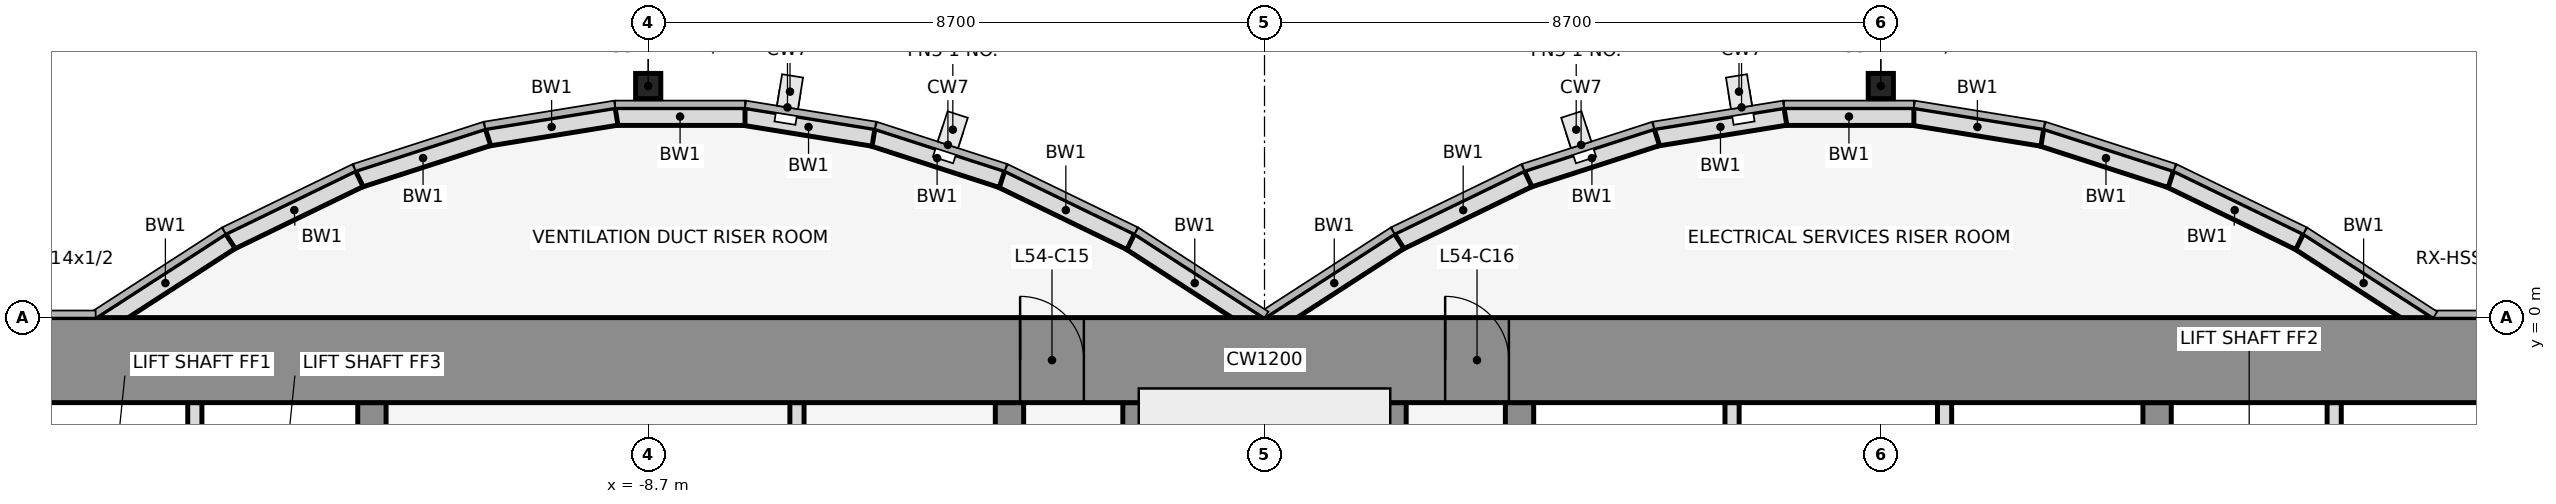
"""IFC4 building model, lengths in metres.
Left out: names, types, materials, properties, quantities, classifications, styles, units other than length and angle.
Written with IfcOpenShell. Run it as: python <this file> out.ifc"""

import sys

from ifc_helpers import new_model, si_unit, direction, frame, frame_2d, origin, origin_2d, place, context, subcontext, project, spatial, rectangle, hollow_rectangle, extrude, element, fill, save


model = new_model("IFC4")
c1 = context("Model", 3, precision=1e-05, world=origin(), true_north=direction((0.0, 1.0)))
c2 = subcontext(c1, "Body", "Model", "MODEL_VIEW")
j1 = project(units=[si_unit("LENGTHUNIT", "METRE"), si_unit("PLANEANGLEUNIT", "RADIAN")], contexts=[c1])
p1 = place(None, origin())
s1 = spatial("IfcSite", under=j1, at=p1, CompositionType="ELEMENT")
p2 = place(p1, origin())
s2 = spatial("IfcBuilding", under=s1, at=p2, CompositionType="ELEMENT")
p3 = place(p2, frame((0.0, 0.0, 241.4)))
s3 = spatial("IfcBuildingStorey", under=s2, at=p3, CompositionType="ELEMENT", Elevation=241.4)
for number, where, z_axis, x_axis in (
    (1, (-8.7, 3.269, 0.0), (0.0, 0.0, 1.0), (1.0, 0.0, 0.0)),
    (2, (8.7, 3.269, 0.0), (0.0, 0.0, 1.0), (1.0, 0.0, 0.0)),
):
    element("IfcColumn", number, at=place(p3, frame(where, z_axis=z_axis, x_axis=x_axis)), inside=s3, PredefinedType="COLUMN", context=c2, shape_type="SweptSolid", body=[
        extrude(hollow_rectangle(XDim=0.356, YDim=0.356, WallThickness=0.012, at=origin_2d()), origin(), (0.0, 0.0, 1.0), 4.2),
    ])
p4 = place(p3, frame((16.432, -0.105, 0.0), z_axis=(0.0, 0.0, 1.0), x_axis=(-0.83981312244, 0.542875602121, 0.0)))
e3 = element("IfcWall", 3, at=p4, inside=s3, PredefinedType="STANDARD", context=c2, shape_type="SweptSolid", body=[
    extrude(rectangle(XDim=2.183, YDim=0.25, at=frame_2d((1.091, 0.0))), origin(), (0.0, 0.0, 1.0), 4.05),
])
p5 = place(p3, frame((14.612, 1.073, 0.0), z_axis=(0.0, 0.0, 1.0), x_axis=(-0.89982408427, 0.436252928206, 0.0)))
e4 = element("IfcWall", 4, at=p5, inside=s3, PredefinedType="STANDARD", context=c2, shape_type="SweptSolid", body=[
    extrude(rectangle(XDim=2.038, YDim=0.25, at=frame_2d((1.019, 0.0))), origin(), (0.0, 0.0, 1.0), 4.05),
])
p6 = place(p3, frame((12.795, 1.955, 0.0), z_axis=(0.0, 0.0, 1.0), x_axis=(-0.951495806175, 0.307661714928, 0.0)))
e5 = element("IfcWall", 5, at=p6, inside=s3, PredefinedType="STANDARD", context=c2, shape_type="SweptSolid", body=[
    extrude(rectangle(XDim=1.927, YDim=0.25, at=frame_2d((0.963, 0.0))), origin(), (0.0, 0.0, 1.0), 4.05),
])
p7 = place(p3, frame((10.98, 2.543, 0.0), z_axis=(0.0, 0.0, 1.0), x_axis=(-0.987181718931, 0.159600293885, 0.0)))
e6 = element("IfcWall", 6, at=p7, inside=s3, PredefinedType="STANDARD", context=c2, shape_type="SweptSolid", body=[
    extrude(rectangle(XDim=1.857, YDim=0.25, at=frame_2d((0.929, 0.0))), origin(), (0.0, 0.0, 1.0), 4.05),
])
p8 = place(p3, frame((9.167, 2.838, 0.0), z_axis=(0.0, 0.0, 1.0), x_axis=(-1.0, 0.0, 0.0)))
e7 = element("IfcWall", 7, at=p8, inside=s3, PredefinedType="STANDARD", context=c2, shape_type="SweptSolid", body=[
    extrude(rectangle(XDim=1.833, YDim=0.25, at=frame_2d((0.917, 0.0))), origin(), (0.0, 0.0, 1.0), 4.05),
])
p9 = place(p3, frame((7.353, 2.84, 0.0), z_axis=(0.0, 0.0, 1.0), x_axis=(-0.987181718931, -0.159600293885, 0.0)))
e8 = element("IfcWall", 8, at=p9, inside=s3, PredefinedType="STANDARD", context=c2, shape_type="SweptSolid", body=[
    extrude(rectangle(XDim=1.857, YDim=0.25, at=frame_2d((0.929, 0.0))), origin(), (0.0, 0.0, 1.0), 4.05),
])
p10 = place(p3, frame((5.538, 2.548, 0.0), z_axis=(0.0, 0.0, 1.0), x_axis=(-0.951495806175, -0.307661714928, 0.0)))
e9 = element("IfcWall", 9, at=p10, inside=s3, PredefinedType="STANDARD", context=c2, shape_type="SweptSolid", body=[
    extrude(rectangle(XDim=1.927, YDim=0.25, at=frame_2d((0.963, 0.0))), origin(), (0.0, 0.0, 1.0), 4.05),
])
p11 = place(p3, frame((3.721, 1.962, 0.0), z_axis=(0.0, 0.0, 1.0), x_axis=(-0.89982408427, -0.436252928206, 0.0)))
e10 = element("IfcWall", 10, at=p11, inside=s3, PredefinedType="STANDARD", context=c2, shape_type="SweptSolid", body=[
    extrude(rectangle(XDim=2.038, YDim=0.25, at=frame_2d((1.019, 0.0))), origin(), (0.0, 0.0, 1.0), 4.05),
])
for number, where, z_axis, x_axis in (
    (11, (1.901, 1.08, 0.0), (0.0, 0.0, 1.0), (-0.84, -0.543, 0.0)),
    (12, (-0.068, -0.105, 0.0), (0.0, 0.0, 1.0), (-0.84, 0.543, 0.0)),
):
    element("IfcWall", number, at=place(p3, frame(where, z_axis=z_axis, x_axis=x_axis)), inside=s3, PredefinedType="STANDARD", context=c2, shape_type="SweptSolid", body=[
        extrude(rectangle(XDim=2.183, YDim=0.25, at=frame_2d((1.091, 0.0))), origin(), (0.0, 0.0, 1.0), 4.05),
    ])
p12 = place(p3, frame((-1.888, 1.073, 0.0), z_axis=(0.0, 0.0, 1.0), x_axis=(-0.89982408427, 0.436252928206, 0.0)))
e13 = element("IfcWall", 13, at=p12, inside=s3, PredefinedType="STANDARD", context=c2, shape_type="SweptSolid", body=[
    extrude(rectangle(XDim=2.038, YDim=0.25, at=frame_2d((1.019, 0.0))), origin(), (0.0, 0.0, 1.0), 4.05),
])
p13 = place(p3, frame((-3.705, 1.955, 0.0), z_axis=(0.0, 0.0, 1.0), x_axis=(-0.951495806175, 0.307661714928, 0.0)))
e14 = element("IfcWall", 14, at=p13, inside=s3, PredefinedType="STANDARD", context=c2, shape_type="SweptSolid", body=[
    extrude(rectangle(XDim=1.927, YDim=0.25, at=frame_2d((0.963, 0.0))), origin(), (0.0, 0.0, 1.0), 4.05),
])
p14 = place(p3, frame((-5.52, 2.543, 0.0), z_axis=(0.0, 0.0, 1.0), x_axis=(-0.987181718931, 0.159600293885, 0.0)))
e15 = element("IfcWall", 15, at=p14, inside=s3, PredefinedType="STANDARD", context=c2, shape_type="SweptSolid", body=[
    extrude(rectangle(XDim=1.857, YDim=0.25, at=frame_2d((0.929, 0.0))), origin(), (0.0, 0.0, 1.0), 4.05),
])
p15 = place(p3, frame((-7.333, 2.838, 0.0), z_axis=(0.0, 0.0, 1.0), x_axis=(-1.0, 0.0, 0.0)))
e16 = element("IfcWall", 16, at=p15, inside=s3, PredefinedType="STANDARD", context=c2, shape_type="SweptSolid", body=[
    extrude(rectangle(XDim=1.833, YDim=0.25, at=frame_2d((0.917, 0.0))), origin(), (0.0, 0.0, 1.0), 4.05),
])
p16 = place(p3, frame((-9.147, 2.84, 0.0), z_axis=(0.0, 0.0, 1.0), x_axis=(-0.987181718931, -0.159600293885, 0.0)))
e17 = element("IfcWall", 17, at=p16, inside=s3, PredefinedType="STANDARD", context=c2, shape_type="SweptSolid", body=[
    extrude(rectangle(XDim=1.857, YDim=0.25, at=frame_2d((0.929, 0.0))), origin(), (0.0, 0.0, 1.0), 4.05),
])
p17 = place(p3, frame((-10.962, 2.548, 0.0), z_axis=(0.0, 0.0, 1.0), x_axis=(-0.951495806175, -0.307661714928, 0.0)))
e18 = element("IfcWall", 18, at=p17, inside=s3, PredefinedType="STANDARD", context=c2, shape_type="SweptSolid", body=[
    extrude(rectangle(XDim=1.927, YDim=0.25, at=frame_2d((0.963, 0.0))), origin(), (0.0, 0.0, 1.0), 4.05),
])
p18 = place(p3, frame((-12.779, 1.962, 0.0), z_axis=(0.0, 0.0, 1.0), x_axis=(-0.89982408427, -0.436252928206, 0.0)))
e19 = element("IfcWall", 19, at=p18, inside=s3, PredefinedType="STANDARD", context=c2, shape_type="SweptSolid", body=[
    extrude(rectangle(XDim=2.038, YDim=0.25, at=frame_2d((1.019, 0.0))), origin(), (0.0, 0.0, 1.0), 4.05),
])
p19 = place(p3, frame((-14.599, 1.08, 0.0), z_axis=(0.0, 0.0, 1.0), x_axis=(-0.83981312244, -0.542875602121, 0.0)))
e20 = element("IfcWall", 20, at=p19, inside=s3, PredefinedType="STANDARD", context=c2, shape_type="SweptSolid", body=[
    extrude(rectangle(XDim=2.183, YDim=0.25, at=frame_2d((1.091, 0.0))), origin(), (0.0, 0.0, 1.0), 4.05),
])
p20 = place(p3, frame((-15.1, -4.6, 0.0), z_axis=(0.0, 0.0, 1.0), x_axis=(0.0, 1.0, 0.0)))
e21 = element("IfcWall", 21, at=p20, inside=s3, PredefinedType="PARTITIONING", context=c2, shape_type="SweptSolid", body=[
    extrude(rectangle(XDim=3.4, YDim=0.2, at=frame_2d((1.7, 0.0))), origin(), (0.0, 0.0, 1.0), 3.118),
])
p21 = place(p3, frame((-12.6, -11.8, 0.0), z_axis=(0.0, 0.0, 1.0), x_axis=(0.0, 1.0, 0.0)))
e22 = element("IfcWall", 22, at=p21, inside=s3, PredefinedType="SHEAR", context=c2, shape_type="SweptSolid", body=[
    extrude(rectangle(XDim=10.6, YDim=0.4, at=frame_2d((5.3, 0.0))), origin(), (0.0, 0.0, 1.0), 4.2),
])
p22 = place(p21, frame((4.75, 0.0, 0.0)))
e23 = element("IfcOpeningElement", 23, at=p22, cuts=e22, PredefinedType="OPENING", context=c2, shape_type="SweptSolid", body=[
    extrude(rectangle(XDim=1.1, YDim=2.1, at=frame_2d((0.55, 1.05))), frame((0.0, 0.212, 0.0), z_axis=(0.0, -1.0, 0.0), x_axis=(1.0, 0.0, 0.0)), (0.0, 0.0, 1.0), 0.424),
])
p23 = place(p3, frame((-6.6, -4.6, 0.0), z_axis=(0.0, 0.0, 1.0), x_axis=(0.0, 1.0, 0.0)))
e24 = element("IfcWall", 24, at=p23, inside=s3, PredefinedType="PARTITIONING", context=c2, shape_type="SweptSolid", body=[
    extrude(rectangle(XDim=3.4, YDim=0.2, at=frame_2d((1.7, 0.0))), origin(), (0.0, 0.0, 1.0), 3.118),
])
p24 = place(p3, frame((-3.6, -11.8, 0.0), z_axis=(0.0, 0.0, 1.0), x_axis=(0.0, 1.0, 0.0)))
e25 = element("IfcWall", 25, at=p24, inside=s3, PredefinedType="SHEAR", context=c2, shape_type="SweptSolid", body=[
    extrude(rectangle(XDim=10.6, YDim=0.4, at=frame_2d((5.3, 0.0))), origin(), (0.0, 0.0, 1.0), 4.2),
])
p25 = place(p24, frame((4.85, 0.0, 0.0)))
e26 = element("IfcOpeningElement", 26, at=p25, cuts=e25, PredefinedType="OPENING", context=c2, shape_type="SweptSolid", body=[
    extrude(rectangle(XDim=0.9, YDim=2.1, at=frame_2d((0.45, 1.05))), frame((0.0, 0.212, 0.0), z_axis=(0.0, -1.0, 0.0), x_axis=(1.0, 0.0, 0.0)), (0.0, 0.0, 1.0), 0.424),
])
for number, where, z_axis, x_axis in (
    (27, (-1.8, -11.8, 0.0), (0.0, 0.0, 1.0), (0.0, 1.0, 0.0)),
    (28, (1.8, -11.8, 0.0), (0.0, 0.0, 1.0), (0.0, 1.0, 0.0)),
):
    element("IfcWall", number, at=place(p3, frame(where, z_axis=z_axis, x_axis=x_axis)), inside=s3, PredefinedType="SHEAR", context=c2, shape_type="SweptSolid", body=[
        extrude(rectangle(XDim=10.6, YDim=0.4, at=frame_2d((5.3, 0.0))), origin(), (0.0, 0.0, 1.0), 4.2),
    ])
p26 = place(p3, frame((3.6, -11.8, 0.0), z_axis=(0.0, 0.0, 1.0), x_axis=(0.0, 1.0, 0.0)))
e29 = element("IfcWall", 29, at=p26, inside=s3, PredefinedType="SHEAR", context=c2, shape_type="SweptSolid", body=[
    extrude(rectangle(XDim=10.6, YDim=0.4, at=frame_2d((5.3, 0.0))), origin(), (0.0, 0.0, 1.0), 4.2),
])
p27 = place(p26, frame((1.35, 0.0, 0.0)))
e30 = element("IfcOpeningElement", 30, at=p27, cuts=e29, PredefinedType="OPENING", context=c2, shape_type="SweptSolid", body=[
    extrude(rectangle(XDim=0.9, YDim=2.1, at=frame_2d((0.45, 1.05))), frame((0.0, 0.212, 0.0), z_axis=(0.0, -1.0, 0.0), x_axis=(1.0, 0.0, 0.0)), (0.0, 0.0, 1.0), 0.424),
])
for number, where, z_axis, x_axis in (
    (31, (6.6, -4.6, 0.0), (0.0, 0.0, 1.0), (0.0, 1.0, 0.0)),
    (32, (9.6, -4.6, 0.0), (0.0, 0.0, 1.0), (0.0, 1.0, 0.0)),
):
    element("IfcWall", number, at=place(p3, frame(where, z_axis=z_axis, x_axis=x_axis)), inside=s3, PredefinedType="PARTITIONING", context=c2, shape_type="SweptSolid", body=[
        extrude(rectangle(XDim=3.4, YDim=0.2, at=frame_2d((1.7, 0.0))), origin(), (0.0, 0.0, 1.0), 3.118),
    ])
p28 = place(p3, frame((12.6, -11.8, 0.0), z_axis=(0.0, 0.0, 1.0), x_axis=(0.0, 1.0, 0.0)))
e33 = element("IfcWall", 33, at=p28, inside=s3, PredefinedType="SHEAR", context=c2, shape_type="SweptSolid", body=[
    extrude(rectangle(XDim=10.6, YDim=0.4, at=frame_2d((5.3, 0.0))), origin(), (0.0, 0.0, 1.0), 4.2),
])
p29 = place(p28, frame((4.75, 0.0, 0.0)))
e34 = element("IfcOpeningElement", 34, at=p29, cuts=e33, PredefinedType="OPENING", context=c2, shape_type="SweptSolid", body=[
    extrude(rectangle(XDim=1.1, YDim=2.1, at=frame_2d((0.55, 1.05))), frame((0.0, 0.212, 0.0), z_axis=(0.0, -1.0, 0.0), x_axis=(1.0, 0.0, 0.0)), (0.0, 0.0, 1.0), 0.424),
])
p30 = place(p3, frame((15.1, -4.6, 0.0), z_axis=(0.0, 0.0, 1.0), x_axis=(0.0, 1.0, 0.0)))
e35 = element("IfcWall", 35, at=p30, inside=s3, PredefinedType="PARTITIONING", context=c2, shape_type="SweptSolid", body=[
    extrude(rectangle(XDim=3.4, YDim=0.2, at=frame_2d((1.7, 0.0))), origin(), (0.0, 0.0, 1.0), 3.118),
])
p31 = place(p3, frame((-22.0, -0.6, 0.0), z_axis=(0.0, 0.0, 1.0), x_axis=(1.0, 0.0, 0.0)))
e36 = element("IfcWall", 36, at=p31, inside=s3, PredefinedType="SHEAR", context=c2, shape_type="SweptSolid", body=[
    extrude(rectangle(XDim=44.0, YDim=1.2, at=frame_2d((22.0, 0.0))), origin(), (0.0, 0.0, 1.0), 4.2),
])
p32 = place(p31, frame((18.55, 0.0, 0.0)))
e37 = element("IfcOpeningElement", 37, at=p32, cuts=e36, PredefinedType="OPENING", context=c2, shape_type="SweptSolid", body=[
    extrude(rectangle(XDim=0.9, YDim=2.1, at=frame_2d((0.45, 1.05))), frame((0.0, 0.612, 0.0), z_axis=(0.0, -1.0, 0.0), x_axis=(1.0, 0.0, 0.0)), (0.0, 0.0, 1.0), 1.224),
])
p33 = place(p31, frame((24.55, 0.0, 0.0)))
e38 = element("IfcOpeningElement", 38, at=p33, cuts=e36, PredefinedType="OPENING", context=c2, shape_type="SweptSolid", body=[
    extrude(rectangle(XDim=0.9, YDim=2.1, at=frame_2d((0.45, 1.05))), frame((0.0, 0.612, 0.0), z_axis=(0.0, -1.0, 0.0), x_axis=(1.0, 0.0, 0.0)), (0.0, 0.0, 1.0), 1.224),
])
p34 = place(p32, origin())
e39 = element("IfcDoor", 39, at=p34, inside=s3, OperationType="SINGLE_SWING_LEFT", PredefinedType="DOOR", context=c2, shape_type="SweptSolid", body=[
    extrude(rectangle(XDim=0.9, YDim=2.1, at=frame_2d((0.45, 1.05))), frame((0.0, 0.025, 0.0), z_axis=(0.0, -1.0, 0.0), x_axis=(1.0, 0.0, 0.0)), (0.0, 0.0, 1.0), 0.05),
])
fill(e37, e39)
p35 = place(p33, origin())
e40 = element("IfcDoor", 40, at=p35, inside=s3, OperationType="SINGLE_SWING_LEFT", PredefinedType="DOOR", context=c2, shape_type="SweptSolid", body=[
    extrude(rectangle(XDim=0.9, YDim=2.1, at=frame_2d((0.45, 1.05))), frame((0.0, 0.025, 0.0), z_axis=(0.0, -1.0, 0.0), x_axis=(1.0, 0.0, 0.0)), (0.0, 0.0, 1.0), 0.05),
])
fill(e38, e40)
save(model, sys.argv[1])
